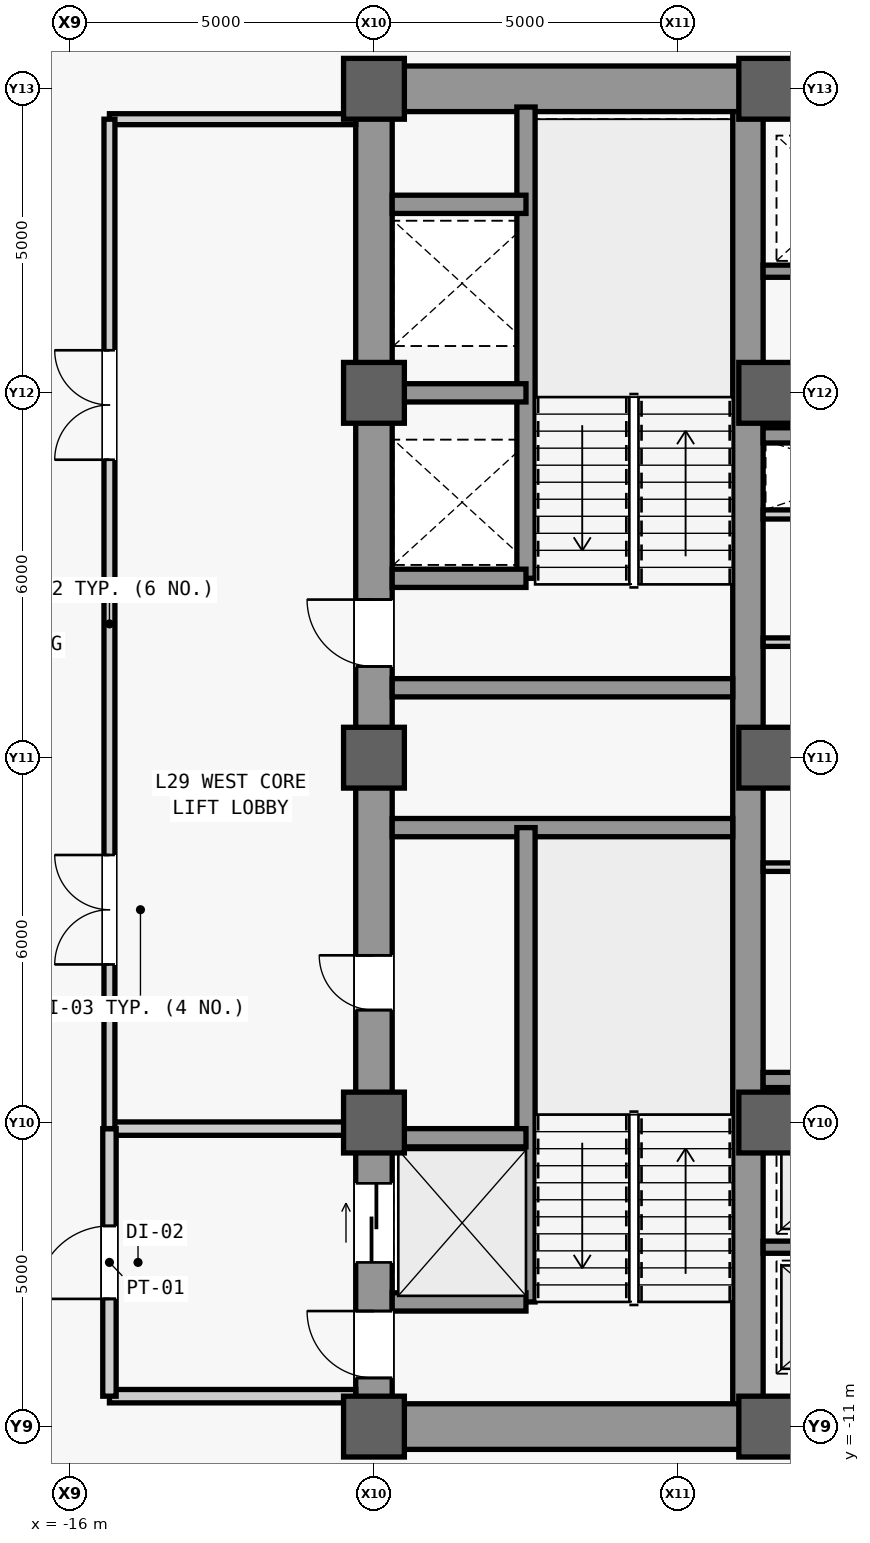
"""IFC4 building model, lengths in metres.
Left out: names, types, materials, properties, quantities, classifications, styles, units other than length and angle.
Written with IfcOpenShell. Run it as: python <this file> out.ifc"""

import sys

from ifc_helpers import new_model, si_unit, direction, frame, frame_2d, origin, origin_2d, place, context, subcontext, project, spatial, rectangle, extrude, source, transform, mapped, element, fill, save


model = new_model("IFC4")
c1 = context("Model", 3, precision=1e-05, world=origin(), true_north=direction((0.0, 1.0)))
c2 = subcontext(c1, "Body", "Model", "MODEL_VIEW")
j1 = project(units=[si_unit("LENGTHUNIT", "METRE"), si_unit("PLANEANGLEUNIT", "RADIAN")], contexts=[c1])
p1 = place(None, origin())
s1 = spatial("IfcSite", under=j1, at=p1, CompositionType="ELEMENT")
p2 = place(p1, origin())
s2 = spatial("IfcBuilding", under=s1, at=p2, CompositionType="ELEMENT")
p3 = place(p2, frame((0.0, 0.0, 128.3)))
s3 = spatial("IfcBuildingStorey", under=s2, at=p3, CompositionType="ELEMENT", Elevation=128.3)
m1 = source(origin(), c2, "Body", "SweptSolid", [
    extrude(rectangle(XDim=22.0, YDim=0.6, at=frame_2d((11.0, 0.0))), origin(), (0.0, 0.0, 1.0), 3.84),
])
p4 = place(p3, frame((-11.0, -11.0, 0.0), z_axis=(0.0, 0.0, 1.0), x_axis=(0.0, 1.0, 0.0)))
e1 = element("IfcWall", 1, at=p4, inside=s3, PredefinedType="SHEAR", context=c2, shape_type="MappedRepresentation", body=[
    mapped(m1, transform((0.0, 0.0, 0.0), scale=1.0)),
])
m2 = source(origin(), c2, "Body", "SweptSolid", [
    extrude(rectangle(XDim=1.1, YDim=2.2, at=frame_2d((0.55, 1.1))), frame((0.0, 0.31, 0.0), z_axis=(0.0, -1.0, 0.0), x_axis=(1.0, 0.0, 0.0)), (0.0, 0.0, 1.0), 0.62),
])
p5 = place(p4, frame((0.8, 0.0, 0.0)))
e2 = element("IfcOpeningElement", 2, at=p5, cuts=e1, PredefinedType="OPENING", context=c2, shape_type="MappedRepresentation", body=[
    mapped(m2, transform((0.0, 0.0, 0.0), scale=1.0)),
])
p6 = place(p4, frame((12.5, 0.0, 0.0)))
e3 = element("IfcOpeningElement", 3, at=p6, cuts=e1, PredefinedType="OPENING", context=c2, shape_type="MappedRepresentation", body=[
    mapped(m2, transform((0.0, 0.0, 0.0), scale=1.0)),
])
m3 = source(origin(), c2, "Body", "SweptSolid", [
    extrude(rectangle(XDim=0.9, YDim=2.15, at=frame_2d((0.45, 1.075))), frame((0.0, 0.31, 0.0), z_axis=(0.0, -1.0, 0.0), x_axis=(1.0, 0.0, 0.0)), (0.0, 0.0, 1.0), 0.62),
])
p7 = place(p4, frame((6.85, 0.0, 0.0)))
e4 = element("IfcOpeningElement", 4, at=p7, cuts=e1, PredefinedType="OPENING", context=c2, shape_type="MappedRepresentation", body=[
    mapped(m3, transform((0.0, 0.0, 0.0), scale=1.0)),
])
m4 = source(origin(), c2, "Body", "SweptSolid", [
    extrude(rectangle(XDim=1.3, YDim=2.3, at=frame_2d((0.65, 1.15))), frame((0.0, 0.31, 0.0), z_axis=(0.0, -1.0, 0.0), x_axis=(1.0, 0.0, 0.0)), (0.0, 0.0, 1.0), 0.62),
])
p8 = place(p4, frame((2.7, 0.0, 0.0)))
e5 = element("IfcOpeningElement", 5, at=p8, cuts=e1, PredefinedType="OPENING", context=c2, shape_type="MappedRepresentation", body=[
    mapped(m4, transform((0.0, 0.0, 0.0), scale=1.0)),
])
m5 = source(origin(), c2, "Body", "SweptSolid", [
    extrude(rectangle(XDim=21.4, YDim=0.5, at=frame_2d((10.7, 0.0))), origin(), (0.0, 0.0, 1.0), 3.84),
])
p9 = place(p3, frame((-4.85, -10.7, 0.0), z_axis=(0.0, 0.0, 1.0), x_axis=(0.0, 1.0, 0.0)))
e6 = element("IfcWall", 6, at=p9, inside=s3, PredefinedType="SHEAR", context=c2, shape_type="MappedRepresentation", body=[
    mapped(m5, transform((0.0, 0.0, 0.0), scale=1.0)),
])
m6 = source(origin(), c2, "Body", "SweptSolid", [
    extrude(rectangle(XDim=5.85, YDim=0.75, at=frame_2d((2.925, 0.0))), origin(), (0.0, 0.0, 1.0), 3.84),
])
for number, where, z_axis, x_axis in (
    (7, (-10.7, -11.0, 0.0), (0.0, 0.0, 1.0), (1.0, 0.0, 0.0)),
    (8, (-10.7, 11.0, 0.0), (0.0, 0.0, 1.0), (1.0, 0.0, 0.0)),
):
    element("IfcWall", number, at=place(p3, frame(where, z_axis=z_axis, x_axis=x_axis)), inside=s3, PredefinedType="SHEAR", context=c2, shape_type="MappedRepresentation", body=[
        mapped(m6, transform((0.0, 0.0, 0.0), scale=1.0)),
    ])
m7 = source(origin(), c2, "Body", "SweptSolid", [
    extrude(rectangle(XDim=5.6, YDim=0.3, at=frame_2d((2.8, 0.0))), origin(), (0.0, 0.0, 1.0), 3.84),
])
for number, where, z_axis, x_axis in (
    (9, (-10.7, -1.15, 0.0), (0.0, 0.0, 1.0), (1.0, 0.0, 0.0)),
    (10, (-10.7, 1.15, 0.0), (0.0, 0.0, 1.0), (1.0, 0.0, 0.0)),
):
    element("IfcWall", number, at=place(p3, frame(where, z_axis=z_axis, x_axis=x_axis)), inside=s3, PredefinedType="SHEAR", context=c2, shape_type="MappedRepresentation", body=[
        mapped(m7, transform((0.0, 0.0, 0.0), scale=1.0)),
    ])
m8 = source(origin(), c2, "Body", "SweptSolid", [
    extrude(rectangle(XDim=9.2, YDim=0.5, at=frame_2d((4.6, 0.0))), origin(), (0.0, 0.0, 1.0), 3.84),
])
p10 = place(p3, frame((-4.6, -11.0, 0.0), z_axis=(0.0, 0.0, 1.0), x_axis=(1.0, 0.0, 0.0)))
e11 = element("IfcWall", 11, at=p10, inside=s3, PredefinedType="SHEAR", context=c2, shape_type="MappedRepresentation", body=[
    mapped(m8, transform((0.0, 0.0, 0.0), scale=1.0)),
])
m9 = source(origin(), c2, "Body", "SweptSolid", [
    extrude(rectangle(XDim=1.8, YDim=2.25, at=frame_2d((0.9, 1.125))), frame((0.0, 0.26, 0.0), z_axis=(0.0, -1.0, 0.0), x_axis=(1.0, 0.0, 0.0)), (0.0, 0.0, 1.0), 0.52),
])
p11 = place(p10, frame((3.7, 0.0, 0.0)))
e12 = element("IfcOpeningElement", 12, at=p11, cuts=e11, PredefinedType="OPENING", context=c2, shape_type="MappedRepresentation", body=[
    mapped(m9, transform((0.0, 0.0, 0.0), scale=1.0)),
])
p12 = place(p3, frame((-4.6, 11.0, 0.0), z_axis=(0.0, 0.0, 1.0), x_axis=(1.0, 0.0, 0.0)))
e13 = element("IfcWall", 13, at=p12, inside=s3, PredefinedType="SHEAR", context=c2, shape_type="MappedRepresentation", body=[
    mapped(m8, transform((0.0, 0.0, 0.0), scale=1.0)),
])
p13 = place(p12, frame((3.7, 0.0, 0.0)))
e14 = element("IfcOpeningElement", 14, at=p13, cuts=e13, PredefinedType="OPENING", context=c2, shape_type="MappedRepresentation", body=[
    mapped(m9, transform((0.0, 0.0, 0.0), scale=1.0)),
])
m10 = source(origin(), c2, "Body", "SweptSolid", [
    extrude(rectangle(XDim=1.0, YDim=1.0, at=origin_2d()), origin(), (0.0, 0.0, 1.0), 4.1),
])
for number, where, z_axis, x_axis in (
    (15, (-11.0, -11.0, 0.0), (0.0, 0.0, 1.0), (1.0, 0.0, 0.0)),
    (16, (-11.0, -6.0, 0.0), (0.0, 0.0, 1.0), (1.0, 0.0, 0.0)),
    (17, (-11.0, 0.0, 0.0), (0.0, 0.0, 1.0), (1.0, 0.0, 0.0)),
    (18, (-11.0, 6.0, 0.0), (0.0, 0.0, 1.0), (1.0, 0.0, 0.0)),
    (19, (-11.0, 11.0, 0.0), (0.0, 0.0, 1.0), (1.0, 0.0, 0.0)),
    (20, (-4.5, -11.0, 0.0), (0.0, 0.0, 1.0), (1.0, 0.0, 0.0)),
    (21, (-4.5, -6.0, 0.0), (0.0, 0.0, 1.0), (1.0, 0.0, 0.0)),
    (22, (-4.5, 0.0, 0.0), (0.0, 0.0, 1.0), (1.0, 0.0, 0.0)),
    (23, (-4.5, 6.0, 0.0), (0.0, 0.0, 1.0), (1.0, 0.0, 0.0)),
    (24, (-4.5, 11.0, 0.0), (0.0, 0.0, 1.0), (1.0, 0.0, 0.0)),
):
    element("IfcColumn", number, at=place(p3, frame(where, z_axis=z_axis, x_axis=x_axis)), inside=s3, PredefinedType="COLUMN", context=c2, shape_type="MappedRepresentation", body=[
        mapped(m10, transform((0.0, 0.0, 0.0), scale=1.0)),
    ])
m11 = source(origin(), c2, "Body", "SweptSolid", [
    extrude(rectangle(XDim=7.8, YDim=0.3, at=frame_2d((3.9, 0.0))), origin(), (0.0, 0.0, 1.0), 3.84),
])
p14 = place(p3, frame((-8.5, -8.95, 0.0), z_axis=(0.0, 0.0, 1.0), x_axis=(0.0, 1.0, 0.0)))
e25 = element("IfcWall", 25, at=p14, inside=s3, PredefinedType="SHEAR", context=c2, shape_type="MappedRepresentation", body=[
    mapped(m11, transform((0.0, 0.0, 0.0), scale=1.0)),
])
m12 = source(origin(), c2, "Body", "SweptSolid", [
    extrude(rectangle(XDim=2.2, YDim=0.3, at=frame_2d((1.1, 0.0))), origin(), (0.0, 0.0, 1.0), 3.84),
])
for number, where, z_axis, x_axis in (
    (26, (-10.7, -8.95, 0.0), (0.0, 0.0, 1.0), (1.0, 0.0, 0.0)),
    (27, (-10.7, -6.25, 0.0), (0.0, 0.0, 1.0), (1.0, 0.0, 0.0)),
):
    element("IfcWall", number, at=place(p3, frame(where, z_axis=z_axis, x_axis=x_axis)), inside=s3, PredefinedType="SHEAR", context=c2, shape_type="MappedRepresentation", body=[
        mapped(m12, transform((0.0, 0.0, 0.0), scale=1.0)),
    ])
m13 = source(origin(), c2, "Body", "SweptSolid", [
    extrude(rectangle(XDim=7.75, YDim=0.3, at=frame_2d((3.875, 0.0))), origin(), (0.0, 0.0, 1.0), 3.84),
])
p15 = place(p3, frame((-8.5, 2.95, 0.0), z_axis=(0.0, 0.0, 1.0), x_axis=(0.0, 1.0, 0.0)))
e28 = element("IfcWall", 28, at=p15, inside=s3, PredefinedType="SHEAR", context=c2, shape_type="MappedRepresentation", body=[
    mapped(m13, transform((0.0, 0.0, 0.0), scale=1.0)),
])
for number, where, z_axis, x_axis in (
    (29, (-10.7, 2.95, 0.0), (0.0, 0.0, 1.0), (1.0, 0.0, 0.0)),
    (30, (-10.7, 6.0, 0.0), (0.0, 0.0, 1.0), (1.0, 0.0, 0.0)),
    (31, (-10.7, 9.1, 0.0), (0.0, 0.0, 1.0), (1.0, 0.0, 0.0)),
):
    element("IfcWall", number, at=place(p3, frame(where, z_axis=z_axis, x_axis=x_axis)), inside=s3, PredefinedType="SHEAR", context=c2, shape_type="MappedRepresentation", body=[
        mapped(m12, transform((0.0, 0.0, 0.0), scale=1.0)),
    ])
m14 = source(origin(), c2, "Body", "SweptSolid", [
    extrude(rectangle(XDim=4.05, YDim=0.22, at=frame_2d((2.025, 0.0))), origin(), (0.0, 0.0, 1.0), 3.84),
])
p16 = place(p3, frame((-15.35, -10.5, 0.0), z_axis=(0.0, 0.0, 1.0), x_axis=(1.0, 0.0, 0.0)))
e32 = element("IfcWall", 32, at=p16, inside=s3, PredefinedType="PARTITIONING", context=c2, shape_type="MappedRepresentation", body=[
    mapped(m14, transform((0.0, 0.0, 0.0), scale=1.0)),
])
m15 = source(origin(), c2, "Body", "SweptSolid", [
    extrude(rectangle(XDim=4.05, YDim=0.22, at=frame_2d((2.025, 0.0))), origin(), (0.0, 0.0, 1.0), 3.067),
])
p17 = place(p3, frame((-15.35, -6.1, 0.0), z_axis=(0.0, 0.0, 1.0), x_axis=(1.0, 0.0, 0.0)))
e33 = element("IfcWall", 33, at=p17, inside=s3, PredefinedType="PARTITIONING", context=c2, shape_type="MappedRepresentation", body=[
    mapped(m15, transform((0.0, 0.0, 0.0), scale=1.0)),
])
m16 = source(origin(), c2, "Body", "SweptSolid", [
    extrude(rectangle(XDim=4.4, YDim=0.22, at=frame_2d((2.2, 0.0))), origin(), (0.0, 0.0, 1.0), 3.84),
])
p18 = place(p3, frame((-15.35, -10.5, 0.0), z_axis=(0.0, 0.0, 1.0), x_axis=(0.0, 1.0, 0.0)))
e34 = element("IfcWall", 34, at=p18, inside=s3, PredefinedType="PARTITIONING", context=c2, shape_type="MappedRepresentation", body=[
    mapped(m16, transform((0.0, 0.0, 0.0), scale=1.0)),
])
m17 = source(origin(), c2, "Body", "SweptSolid", [
    extrude(rectangle(XDim=1.2, YDim=2.2, at=frame_2d((0.6, 1.1))), frame((0.0, 0.12, 0.0), z_axis=(0.0, -1.0, 0.0), x_axis=(1.0, 0.0, 0.0)), (0.0, 0.0, 1.0), 0.24),
])
p19 = place(p18, frame((1.6, 0.0, 0.0)))
e35 = element("IfcOpeningElement", 35, at=p19, cuts=e34, PredefinedType="OPENING", context=c2, shape_type="MappedRepresentation", body=[
    mapped(m17, transform((0.0, 0.0, 0.0), scale=1.0)),
])
m18 = source(origin(), c2, "Body", "SweptSolid", [
    extrude(rectangle(XDim=4.05, YDim=0.18, at=frame_2d((2.025, 0.0))), origin(), (0.0, 0.0, 1.0), 3.84),
])
p20 = place(p3, frame((-15.35, 10.5, 0.0), z_axis=(0.0, 0.0, 1.0), x_axis=(1.0, 0.0, 0.0)))
e36 = element("IfcWall", 36, at=p20, inside=s3, PredefinedType="PARTITIONING", context=c2, shape_type="MappedRepresentation", body=[
    mapped(m18, transform((0.0, 0.0, 0.0), scale=1.0)),
])
m19 = source(origin(), c2, "Body", "SweptSolid", [
    extrude(rectangle(XDim=16.6, YDim=0.18, at=frame_2d((8.3, 0.0))), origin(), (0.0, 0.0, 1.0), 3.84),
])
p21 = place(p3, frame((-15.35, -6.1, 0.0), z_axis=(0.0, 0.0, 1.0), x_axis=(0.0, 1.0, 0.0)))
e37 = element("IfcWall", 37, at=p21, inside=s3, PredefinedType="PARTITIONING", context=c2, shape_type="MappedRepresentation", body=[
    mapped(m19, transform((0.0, 0.0, 0.0), scale=1.0)),
])
m20 = source(origin(), c2, "Body", "SweptSolid", [
    extrude(rectangle(XDim=1.8, YDim=2.25, at=frame_2d((0.9, 1.125))), frame((0.0, 0.1, 0.0), z_axis=(0.0, -1.0, 0.0), x_axis=(1.0, 0.0, 0.0)), (0.0, 0.0, 1.0), 0.2),
])
p22 = place(p21, frame((2.7, 0.0, 0.0)))
e38 = element("IfcOpeningElement", 38, at=p22, cuts=e37, PredefinedType="OPENING", context=c2, shape_type="MappedRepresentation", body=[
    mapped(m20, transform((0.0, 0.0, 0.0), scale=1.0)),
])
p23 = place(p21, frame((11.0, 0.0, 0.0)))
e39 = element("IfcOpeningElement", 39, at=p23, cuts=e37, PredefinedType="OPENING", context=c2, shape_type="MappedRepresentation", body=[
    mapped(m20, transform((0.0, 0.0, 0.0), scale=1.0)),
])
m21 = source(origin(), c2, "Body", "SweptSolid", [
    extrude(rectangle(XDim=3.45, YDim=0.15, at=frame_2d((1.725, 0.0))), origin(), (0.0, 0.0, 1.0), 3.84),
])
p24 = place(p3, frame((-4.6, 4.0, 0.0), z_axis=(0.0, 0.0, 1.0), x_axis=(1.0, 0.0, 0.0)))
e40 = element("IfcWall", 40, at=p24, inside=s3, PredefinedType="PARTITIONING", context=c2, shape_type="MappedRepresentation", body=[
    mapped(m21, transform((0.0, 0.0, 0.0), scale=1.0)),
])
m22 = source(origin(), c2, "Body", "SweptSolid", [
    extrude(rectangle(XDim=2.45, YDim=0.2, at=frame_2d((1.225, 0.0))), origin(), (0.0, 0.0, 1.0), 3.84),
])
p25 = place(p3, frame((-4.6, -8.05, 0.0), z_axis=(0.0, 0.0, 1.0), x_axis=(1.0, 0.0, 0.0)))
e41 = element("IfcWall", 41, at=p25, inside=s3, PredefinedType="SHEAR", context=c2, shape_type="MappedRepresentation", body=[
    mapped(m22, transform((0.0, 0.0, 0.0), scale=1.0)),
])
m23 = source(origin(), c2, "Body", "SweptSolid", [
    extrude(rectangle(XDim=9.2, YDim=0.25, at=frame_2d((4.6, 0.0))), origin(), (0.0, 0.0, 1.0), 3.84),
])
p26 = place(p3, frame((-4.6, -5.3, 0.0), z_axis=(0.0, 0.0, 1.0), x_axis=(1.0, 0.0, 0.0)))
e42 = element("IfcWall", 42, at=p26, inside=s3, PredefinedType="SHEAR", context=c2, shape_type="MappedRepresentation", body=[
    mapped(m23, transform((0.0, 0.0, 0.0), scale=1.0)),
])
m24 = source(origin(), c2, "Body", "SweptSolid", [
    extrude(rectangle(XDim=1.05, YDim=2.2, at=frame_2d((0.525, 1.1))), frame((0.0, 0.135, 0.0), z_axis=(0.0, -1.0, 0.0), x_axis=(1.0, 0.0, 0.0)), (0.0, 0.0, 1.0), 0.27),
])
p27 = place(p26, frame((4.075, 0.0, 0.0)))
e43 = element("IfcOpeningElement", 43, at=p27, cuts=e42, PredefinedType="OPENING", context=c2, shape_type="MappedRepresentation", body=[
    mapped(m24, transform((0.0, 0.0, 0.0), scale=1.0)),
])
p28 = place(p3, frame((-4.6, 8.0, 0.0), z_axis=(0.0, 0.0, 1.0), x_axis=(1.0, 0.0, 0.0)))
e44 = element("IfcWall", 44, at=p28, inside=s3, PredefinedType="SHEAR", context=c2, shape_type="MappedRepresentation", body=[
    mapped(m22, transform((0.0, 0.0, 0.0), scale=1.0)),
])
p29 = place(p3, frame((-4.6, 5.3, 0.0), z_axis=(0.0, 0.0, 1.0), x_axis=(1.0, 0.0, 0.0)))
e45 = element("IfcWall", 45, at=p29, inside=s3, PredefinedType="SHEAR", context=c2, shape_type="MappedRepresentation", body=[
    mapped(m23, transform((0.0, 0.0, 0.0), scale=1.0)),
])
p30 = place(p29, frame((4.075, 0.0, 0.0)))
e46 = element("IfcOpeningElement", 46, at=p30, cuts=e45, PredefinedType="OPENING", context=c2, shape_type="MappedRepresentation", body=[
    mapped(m24, transform((0.0, 0.0, 0.0), scale=1.0)),
])
m25 = source(origin(), c2, "Body", "SweptSolid", [
    extrude(rectangle(XDim=3.45, YDim=0.14, at=frame_2d((1.725, 0.0))), origin(), (0.0, 0.0, 1.0), 3.84),
])
for number, where, z_axis, x_axis in (
    (47, (-4.6, -1.8, 0.0), (0.0, 0.0, 1.0), (1.0, 0.0, 0.0)),
    (48, (-4.6, 1.9, 0.0), (0.0, 0.0, 1.0), (1.0, 0.0, 0.0)),
):
    element("IfcWall", number, at=place(p3, frame(where, z_axis=z_axis, x_axis=x_axis)), inside=s3, PredefinedType="PARTITIONING", context=c2, shape_type="MappedRepresentation", body=[
        mapped(m25, transform((0.0, 0.0, 0.0), scale=1.0)),
    ])
m26 = source(origin(), c2, "Body", "SweptSolid", [
    extrude(rectangle(XDim=1.1, YDim=2.2, at=frame_2d((0.55, 1.1))), frame((0.0, 0.025, 0.0), z_axis=(0.0, -1.0, 0.0), x_axis=(1.0, 0.0, 0.0)), (0.0, 0.0, 1.0), 0.05),
])
p31 = place(p5, origin())
e49 = element("IfcDoor", 49, at=p31, inside=s3, OperationType="SINGLE_SWING_RIGHT", PredefinedType="DOOR", context=c2, shape_type="MappedRepresentation", body=[
    mapped(m26, transform((0.0, 0.0, 0.0), scale=1.0)),
])
fill(e2, e49)
p32 = place(p6, origin())
e50 = element("IfcDoor", 50, at=p32, inside=s3, OperationType="SINGLE_SWING_RIGHT", PredefinedType="DOOR", context=c2, shape_type="MappedRepresentation", body=[
    mapped(m26, transform((0.0, 0.0, 0.0), scale=1.0)),
])
fill(e3, e50)
m27 = source(origin(), c2, "Body", "SweptSolid", [
    extrude(rectangle(XDim=0.9, YDim=2.15, at=frame_2d((0.45, 1.075))), frame((0.0, 0.025, 0.0), z_axis=(0.0, -1.0, 0.0), x_axis=(1.0, 0.0, 0.0)), (0.0, 0.0, 1.0), 0.05),
])
p33 = place(p7, origin())
e51 = element("IfcDoor", 51, at=p33, inside=s3, OperationType="SINGLE_SWING_RIGHT", PredefinedType="DOOR", context=c2, shape_type="MappedRepresentation", body=[
    mapped(m27, transform((0.0, 0.0, 0.0), scale=1.0)),
])
fill(e4, e51)
m28 = source(origin(), c2, "Body", "SweptSolid", [
    extrude(rectangle(XDim=1.2, YDim=2.2, at=frame_2d((0.6, 1.1))), frame((0.0, 0.025, 0.0), z_axis=(0.0, -1.0, 0.0), x_axis=(1.0, 0.0, 0.0)), (0.0, 0.0, 1.0), 0.05),
])
p34 = place(p19, origin())
e52 = element("IfcDoor", 52, at=p34, inside=s3, OperationType="SINGLE_SWING_LEFT", PredefinedType="DOOR", context=c2, shape_type="MappedRepresentation", body=[
    mapped(m28, transform((0.0, 0.0, 0.0), scale=1.0)),
])
fill(e35, e52)
m29 = source(origin(), c2, "Body", "SweptSolid", [
    extrude(rectangle(XDim=1.8, YDim=2.25, at=frame_2d((0.9, 1.125))), frame((0.0, 0.025, 0.0), z_axis=(0.0, -1.0, 0.0), x_axis=(1.0, 0.0, 0.0)), (0.0, 0.0, 1.0), 0.05),
])
p35 = place(p22, origin())
e53 = element("IfcDoor", 53, at=p35, inside=s3, OperationType="SINGLE_SWING_LEFT", PredefinedType="DOOR", context=c2, shape_type="MappedRepresentation", body=[
    mapped(m29, transform((0.0, 0.0, 0.0), scale=1.0)),
])
fill(e38, e53)
p36 = place(p23, origin())
e54 = element("IfcDoor", 54, at=p36, inside=s3, OperationType="SINGLE_SWING_RIGHT", PredefinedType="DOOR", context=c2, shape_type="MappedRepresentation", body=[
    mapped(m29, transform((0.0, 0.0, 0.0), scale=1.0)),
])
fill(e39, e54)
m30 = source(origin(), c2, "Body", "SweptSolid", [
    extrude(rectangle(XDim=1.3, YDim=2.3, at=frame_2d((0.65, 1.15))), frame((0.0, 0.025, 0.0), z_axis=(0.0, -1.0, 0.0), x_axis=(1.0, 0.0, 0.0)), (0.0, 0.0, 1.0), 0.05),
])
p37 = place(p8, origin())
e55 = element("IfcDoor", 55, at=p37, inside=s3, OperationType="SLIDING_TO_LEFT", PredefinedType="DOOR", context=c2, shape_type="MappedRepresentation", body=[
    mapped(m30, transform((0.0, 0.0, 0.0), scale=1.0)),
])
fill(e5, e55)
save(model, sys.argv[1])
